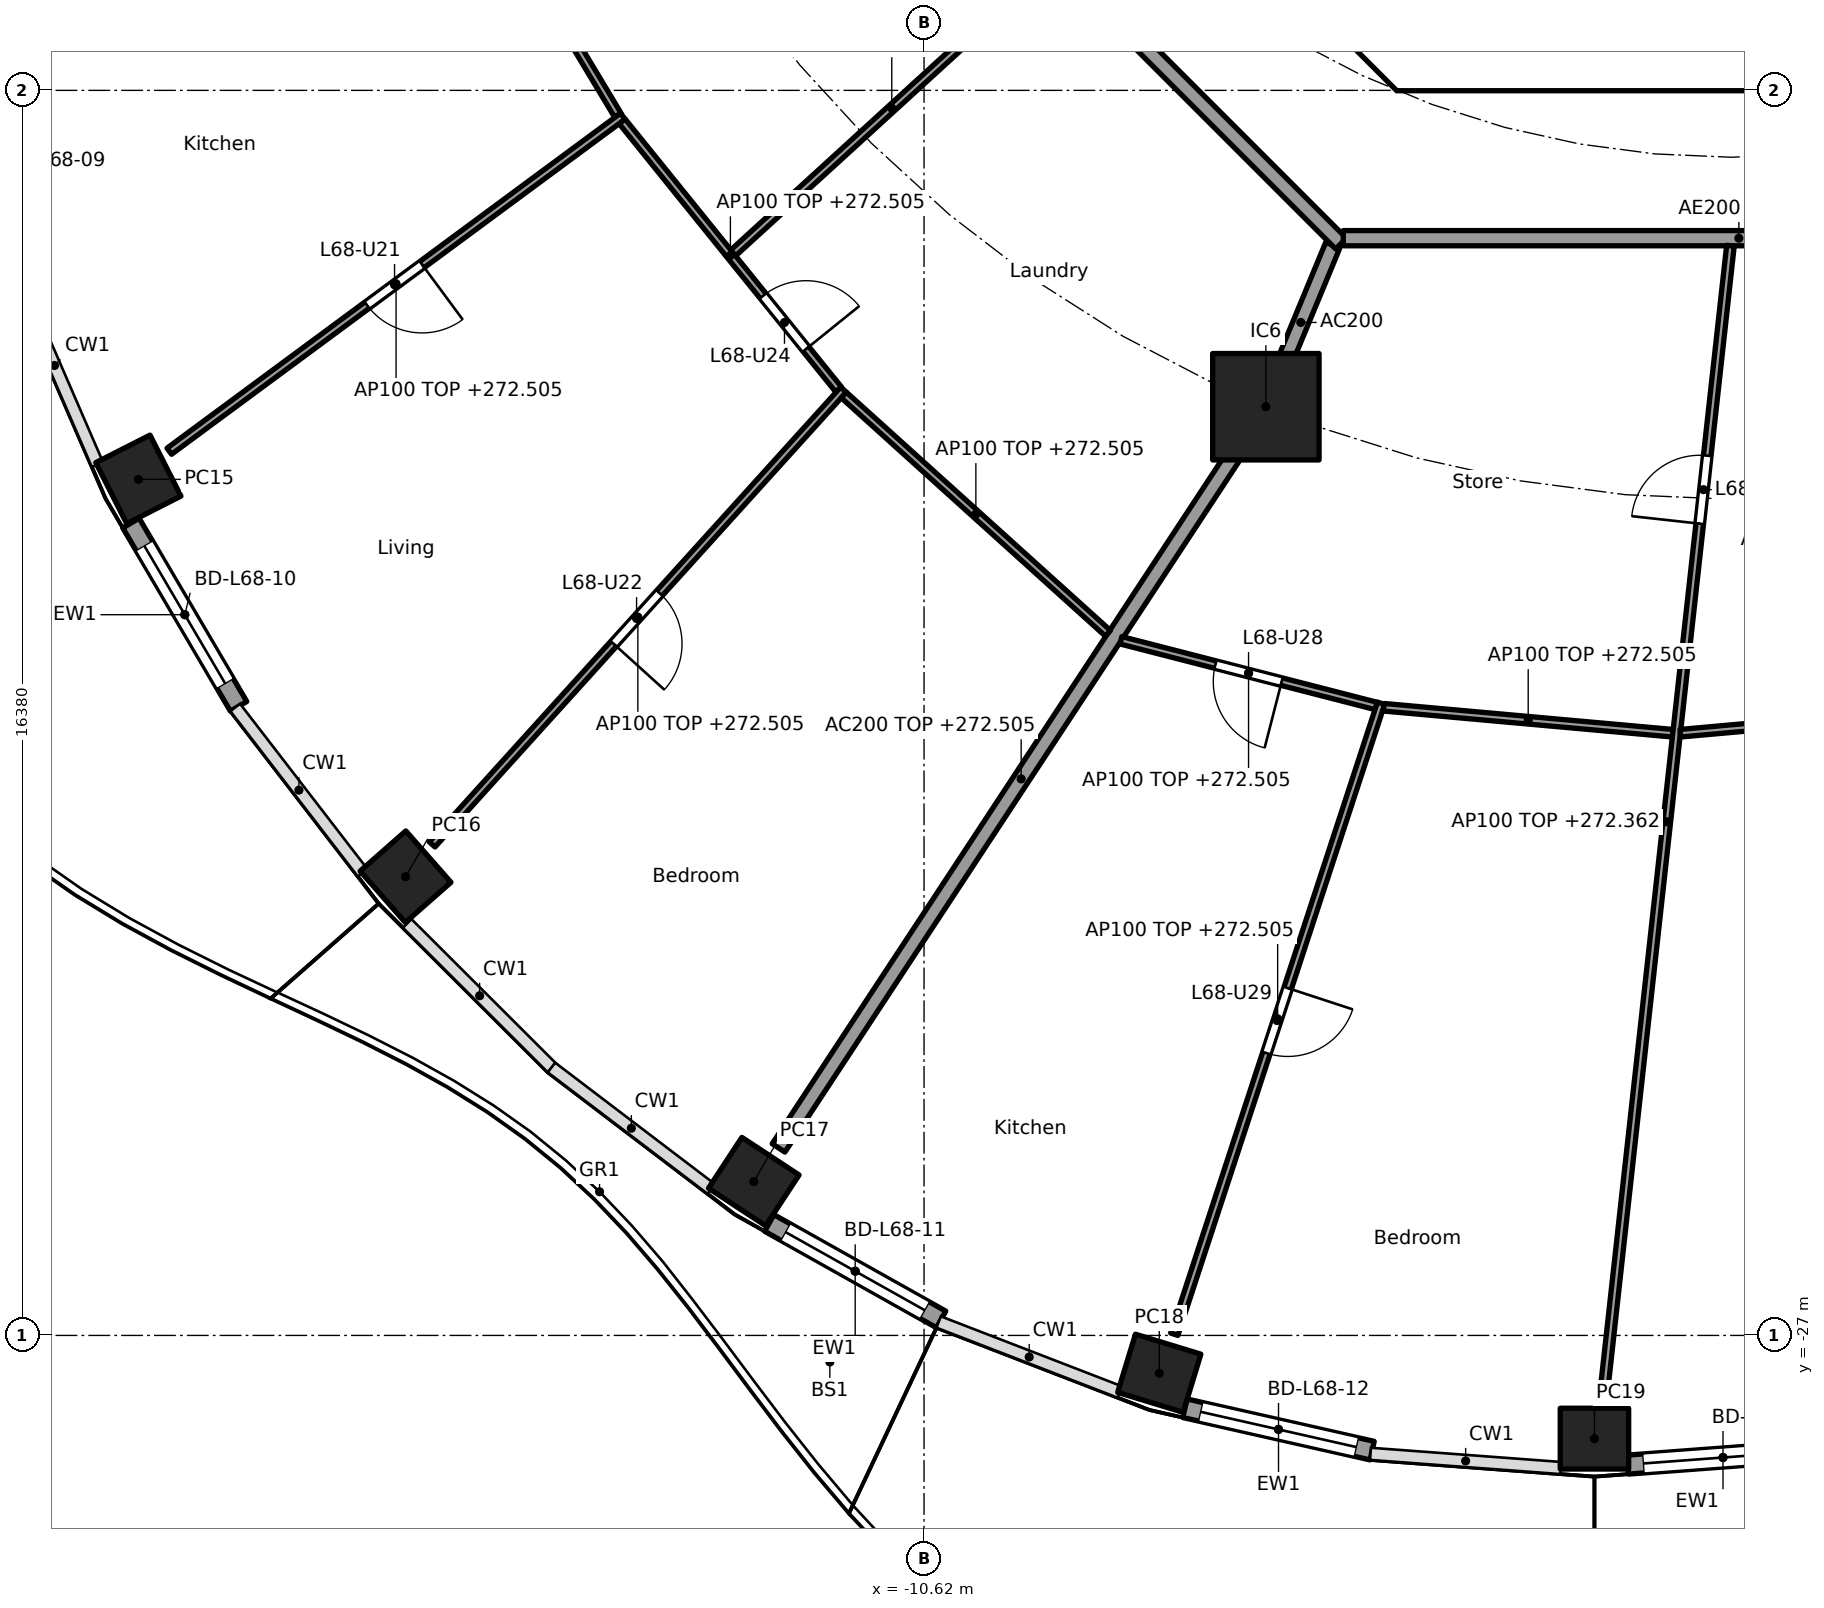
"""IFC4 building model, lengths in metres.
Left out: names, types, materials, properties, quantities, classifications, styles, units other than length and angle.
Written with IfcOpenShell. Run it as: python <this file> out.ifc"""

import sys

from ifc_helpers import new_model, si_unit, direction, frame, frame_2d, origin, origin_2d, place, context, subcontext, project, spatial, polyline, rectangle, hollow_rectangle, outline, extrude, element, fill, save


model = new_model("IFC4")
c1 = context("Model", 3, precision=1e-05, world=origin(), true_north=direction((0.0, 1.0)))
c2 = subcontext(c1, "Body", "Model", "MODEL_VIEW")
j1 = project(units=[si_unit("LENGTHUNIT", "METRE"), si_unit("PLANEANGLEUNIT", "RADIAN")], contexts=[c1])
p1 = place(None, origin())
s1 = spatial("IfcSite", under=j1, at=p1, CompositionType="ELEMENT")
p2 = place(p1, origin())
s2 = spatial("IfcBuilding", under=s1, at=p2, CompositionType="ELEMENT")
p3 = place(p2, frame((0.0, 0.0, 269.6)))
s3 = spatial("IfcBuildingStorey", under=s2, at=p3, CompositionType="ELEMENT", Elevation=269.6)
for number, where, z_axis, x_axis in (
    (1, (-20.957, -15.738, 0.0), (0.0, 0.0, 1.0), (0.452, -0.892, 0.0)),
    (2, (-17.441, -20.965, 0.0), (0.0, 0.0, 1.0), (0.66, -0.751, 0.0)),
    (3, (-12.86, -24.976, 0.0), (0.0, 0.0, 1.0), (0.836, -0.549, 0.0)),
    (4, (-7.525, -27.498, 0.0), (0.0, 0.0, 1.0), (0.957, -0.292, 0.0)),
    (5, (-1.8, -28.358, 0.0), (0.0, 0.0, 1.0), (1.0, 0.0, 0.0)),
):
    element("IfcColumn", number, at=place(p3, frame(where, z_axis=z_axis, x_axis=x_axis)), inside=s3, PredefinedType="COLUMN", context=c2, shape_type="SweptSolid", body=[
        extrude(hollow_rectangle(XDim=0.9, YDim=0.8, WallThickness=0.028, at=origin_2d()), origin(), (0.0, 0.0, 1.0), 3.7),
    ])
p4 = place(p3, frame((-6.123, -14.782, 0.0), z_axis=(0.0, 0.0, 1.0), x_axis=(1.0, 0.0, 0.0)))
e6 = element("IfcColumn", 6, at=p4, inside=s3, PredefinedType="COLUMN", context=c2, shape_type="SweptSolid", body=[
    extrude(rectangle(XDim=1.4, YDim=1.4, at=origin_2d()), origin(), (0.0, 0.0, 1.0), 3.7),
])
p5 = place(p3, frame((-19.638, -18.724, 0.0), z_axis=(0.0, 0.0, 1.0), x_axis=(-0.506371364425, 0.862315511452, 0.0)))
e7 = element("IfcWall", 7, at=p5, inside=s3, PredefinedType="SOLIDWALL", context=c2, shape_type="SweptSolid", body=[
    extrude(rectangle(XDim=2.796, YDim=0.25, at=frame_2d((1.398, 0.0))), origin(), (0.0, 0.0, 1.0), 3.44),
])
p6 = place(p5, frame((0.348, 0.0, 0.0)))
e8 = element("IfcOpeningElement", 8, at=p6, cuts=e7, PredefinedType="OPENING", context=c2, shape_type="SweptSolid", body=[
    extrude(rectangle(XDim=2.1, YDim=2.4, at=frame_2d((1.05, 1.2))), frame((0.0, 0.135, 0.0), z_axis=(0.0, -1.0, 0.0), x_axis=(1.0, 0.0, 0.0)), (0.0, 0.0, 1.0), 0.27),
])
p7 = place(p3, frame((-10.395, -26.789, 0.0), z_axis=(0.0, 0.0, 1.0), x_axis=(-0.872115604046, 0.489299880625, 0.0)))
e9 = element("IfcWall", 9, at=p7, inside=s3, PredefinedType="SOLIDWALL", context=c2, shape_type="SweptSolid", body=[
    extrude(rectangle(XDim=2.593, YDim=0.25, at=frame_2d((1.296, 0.0))), origin(), (0.0, 0.0, 1.0), 3.44),
])
p8 = place(p7, frame((0.247, 0.0, 0.0)))
e10 = element("IfcOpeningElement", 10, at=p8, cuts=e9, PredefinedType="OPENING", context=c2, shape_type="SweptSolid", body=[
    extrude(rectangle(XDim=2.1, YDim=2.4, at=frame_2d((1.05, 1.2))), frame((0.0, 0.135, 0.0), z_axis=(0.0, -1.0, 0.0), x_axis=(1.0, 0.0, 0.0)), (0.0, 0.0, 1.0), 0.27),
])
p9 = place(p3, frame((-4.725, -28.516, 0.0), z_axis=(0.0, 0.0, 1.0), x_axis=(-0.975319584032, 0.220797891756, 0.0)))
e11 = element("IfcWall", 11, at=p9, inside=s3, PredefinedType="SOLIDWALL", context=c2, shape_type="SweptSolid", body=[
    extrude(rectangle(XDim=2.525, YDim=0.25, at=frame_2d((1.263, 0.0))), origin(), (0.0, 0.0, 1.0), 3.44),
])
p10 = place(p9, frame((0.213, 0.0, 0.0)))
e12 = element("IfcOpeningElement", 12, at=p10, cuts=e11, PredefinedType="OPENING", context=c2, shape_type="SweptSolid", body=[
    extrude(rectangle(XDim=2.1, YDim=2.4, at=frame_2d((1.05, 1.2))), frame((0.0, 0.135, 0.0), z_axis=(0.0, -1.0, 0.0), x_axis=(1.0, 0.0, 0.0)), (0.0, 0.0, 1.0), 0.27),
])
p11 = place(p3, frame((1.143, -28.513, 0.0), z_axis=(0.0, 0.0, 1.0), x_axis=(-0.997236892469, -0.074287147606, 0.0)))
e13 = element("IfcWall", 13, at=p11, inside=s3, PredefinedType="SOLIDWALL", context=c2, shape_type="SweptSolid", body=[
    extrude(rectangle(XDim=2.511, YDim=0.25, at=frame_2d((1.255, 0.0))), origin(), (0.0, 0.0, 1.0), 3.44),
])
p12 = place(p11, frame((0.205, 0.0, 0.0)))
e14 = element("IfcOpeningElement", 14, at=p12, cuts=e13, PredefinedType="OPENING", context=c2, shape_type="SweptSolid", body=[
    extrude(rectangle(XDim=2.1, YDim=2.4, at=frame_2d((1.05, 1.2))), frame((0.0, 0.135, 0.0), z_axis=(0.0, -1.0, 0.0), x_axis=(1.0, 0.0, 0.0)), (0.0, 0.0, 1.0), 0.27),
])
p13 = place(p3, frame((-9.988, -4.613, 0.0), z_axis=(0.0, 0.0, 1.0), x_axis=(0.707106781187, -0.707106781187, 0.0)))
e15 = element("IfcWall", 15, at=p13, inside=s3, PredefinedType="SHEAR", context=c2, shape_type="SweptSolid", body=[
    extrude(rectangle(XDim=7.602, YDim=0.6, at=frame_2d((3.801, 0.0))), origin(), (0.0, 0.0, 1.0), 3.44),
])
p14 = place(p13, frame((6.151, 0.0, 0.0)))
e16 = element("IfcOpeningElement", 16, at=p14, cuts=e15, PredefinedType="OPENING", context=c2, shape_type="SweptSolid", body=[
    extrude(rectangle(XDim=1.1, YDim=2.1, at=frame_2d((0.55, 1.05))), frame((0.0, 0.31, 0.0), z_axis=(0.0, -1.0, 0.0), x_axis=(1.0, 0.0, 0.0)), (0.0, 0.0, 1.0), 0.62),
])
p15 = place(p3, origin())
e17 = element("IfcWall", 17, at=p15, inside=s3, PredefinedType="SHEAR", context=c2, shape_type="SweptSolid", body=[
    extrude(outline(polyline([(-4.152, -10.025), (4.152, -10.025), (4.401, -9.776), (4.825, -10.2), (4.401, -10.625), (-4.401, -10.625), (-4.825, -10.2), (-4.401, -9.776), (-4.152, -10.025)])), origin(), (0.0, 0.0, 1.0), 3.44),
])
p16 = place(p3, frame((-5.243, -12.657, 0.0), z_axis=(0.0, 0.0, 1.0), x_axis=(-0.382770106157, -0.923843626288, 0.0)))
e18 = element("IfcWall", 18, at=p16, inside=s3, PredefinedType="PARTITIONING", context=c2, shape_type="SweptSolid", body=[
    extrude(rectangle(XDim=2.199, YDim=0.2, at=frame_2d((1.1, 0.0))), origin(), (0.0, 0.0, 1.0), 3.44),
])
p17 = place(p3, frame((-6.151, -14.824, 0.0), z_axis=(0.0, 0.0, 1.0), x_axis=(-0.549345577828, -0.835595258556, 0.0)))
e19 = element("IfcWall", 19, at=p17, inside=s3, PredefinedType="PARTITIONING", context=c2, shape_type="SweptSolid", body=[
    extrude(rectangle(XDim=11.62, YDim=0.2, at=frame_2d((5.81, 0.0))), origin(), (0.0, 0.0, 1.0), 2.905),
])
p18 = place(p3, frame((-12.635, -5.134, 0.0), z_axis=(0.0, 0.0, 1.0), x_axis=(0.707106781187, -0.707106781187, 0.0)))
e20 = element("IfcWall", 20, at=p18, inside=s3, PredefinedType="PARTITIONING", context=c2, shape_type="SweptSolid", body=[
    extrude(rectangle(XDim=10.609, YDim=0.2, at=frame_2d((5.305, 0.0))), origin(), (0.0, 0.0, 1.0), 3.44),
])
p19 = place(p3, frame((-5.104, -12.565, 0.0), z_axis=(0.0, 0.0, 1.0), x_axis=(1.0, 0.0, 0.0)))
e21 = element("IfcWall", 21, at=p19, inside=s3, PredefinedType="PARTITIONING", context=c2, shape_type="SweptSolid", body=[
    extrude(rectangle(XDim=10.409, YDim=0.2, at=frame_2d((5.205, 0.0))), origin(), (0.0, 0.0, 1.0), 3.44),
])
p20 = place(p19, frame((5.906, 0.0, 0.0)))
e22 = element("IfcOpeningElement", 22, at=p20, cuts=e21, PredefinedType="OPENING", context=c2, shape_type="SweptSolid", body=[
    extrude(rectangle(XDim=1.0, YDim=2.1, at=frame_2d((0.5, 1.05))), frame((0.0, 0.11, 0.0), z_axis=(0.0, -1.0, 0.0), x_axis=(1.0, 0.0, 0.0)), (0.0, 0.0, 1.0), 0.22),
])
p21 = place(p3, frame((-16.972, -7.08, 0.0), z_axis=(0.0, 0.0, 1.0), x_axis=(0.514989049311, -0.857196756346, 0.0)))
e23 = element("IfcWall", 23, at=p21, inside=s3, PredefinedType="PARTITIONING", context=c2, shape_type="SweptSolid", body=[
    extrude(rectangle(XDim=4.512, YDim=0.1, at=frame_2d((2.256, 0.0))), origin(), (0.0, 0.0, 1.0), 2.905),
])
p22 = place(p21, frame((1.806, 0.0, 0.0)))
e24 = element("IfcOpeningElement", 24, at=p22, cuts=e23, PredefinedType="OPENING", context=c2, shape_type="SweptSolid", body=[
    extrude(rectangle(XDim=0.9, YDim=2.1, at=frame_2d((0.45, 1.05))), frame((0.0, 0.06, 0.0), z_axis=(0.0, -1.0, 0.0), x_axis=(1.0, 0.0, 0.0)), (0.0, 0.0, 1.0), 0.12),
])
p23 = place(p3, frame((-14.582, -10.96, 0.0), z_axis=(0.0, 0.0, 1.0), x_axis=(-0.804405200554, -0.594081032623, 0.0)))
e25 = element("IfcWall", 25, at=p23, inside=s3, PredefinedType="PARTITIONING", context=c2, shape_type="SweptSolid", body=[
    extrude(rectangle(XDim=7.418, YDim=0.1, at=frame_2d((3.709, 0.0))), origin(), (0.0, 0.0, 1.0), 2.905),
])
p24 = place(p23, frame((3.284, 0.0, 0.0)))
e26 = element("IfcOpeningElement", 26, at=p24, cuts=e25, PredefinedType="OPENING", context=c2, shape_type="SweptSolid", body=[
    extrude(rectangle(XDim=0.9, YDim=2.1, at=frame_2d((0.45, 1.05))), frame((0.0, 0.06, 0.0), z_axis=(0.0, -1.0, 0.0), x_axis=(1.0, 0.0, 0.0)), (0.0, 0.0, 1.0), 0.12),
])
p25 = place(p3, frame((-14.591, -11.029, 0.0), z_axis=(0.0, 0.0, 1.0), x_axis=(0.628170338674, -0.778075848237, 0.0)))
e27 = element("IfcWall", 27, at=p25, inside=s3, PredefinedType="PARTITIONING", context=c2, shape_type="SweptSolid", body=[
    extrude(rectangle(XDim=4.532, YDim=0.1, at=frame_2d((2.266, 0.0))), origin(), (0.0, 0.0, 1.0), 2.905),
])
p26 = place(p25, frame((2.949, 0.0, 0.0)))
e28 = element("IfcOpeningElement", 28, at=p26, cuts=e27, PredefinedType="OPENING", context=c2, shape_type="SweptSolid", body=[
    extrude(rectangle(XDim=0.9, YDim=2.1, at=frame_2d((0.45, 1.05))), frame((0.0, 0.06, 0.0), z_axis=(0.0, -1.0, 0.0), x_axis=(1.0, 0.0, 0.0)), (0.0, 0.0, 1.0), 0.12),
])
p27 = place(p3, frame((-8.958, -8.952, 0.0), z_axis=(0.0, 0.0, 1.0), x_axis=(-0.73876526954, -0.673962815385, 0.0)))
e29 = element("IfcWall", 29, at=p27, inside=s3, PredefinedType="PARTITIONING", context=c2, shape_type="SweptSolid", body=[
    extrude(rectangle(XDim=5.647, YDim=0.1, at=frame_2d((2.824, 0.0))), origin(), (0.0, 0.0, 1.0), 2.762),
])
p28 = place(p3, frame((-11.679, -14.557, 0.0), z_axis=(0.0, 0.0, 1.0), x_axis=(-0.670800011545, -0.741638284146, 0.0)))
e30 = element("IfcWall", 30, at=p28, inside=s3, PredefinedType="PARTITIONING", context=c2, shape_type="SweptSolid", body=[
    extrude(rectangle(XDim=8.068, YDim=0.1, at=frame_2d((4.034, 0.0))), origin(), (0.0, 0.0, 1.0), 2.905),
])
p29 = place(p28, frame((3.609, 0.0, 0.0)))
e31 = element("IfcOpeningElement", 31, at=p29, cuts=e30, PredefinedType="OPENING", context=c2, shape_type="SweptSolid", body=[
    extrude(rectangle(XDim=0.9, YDim=2.1, at=frame_2d((0.45, 1.05))), frame((0.0, 0.06, 0.0), z_axis=(0.0, -1.0, 0.0), x_axis=(1.0, 0.0, 0.0)), (0.0, 0.0, 1.0), 0.12),
])
p30 = place(p3, frame((-11.676, -14.628, 0.0), z_axis=(0.0, 0.0, 1.0), x_axis=(0.74245829867, -0.669892285921, 0.0)))
e32 = element("IfcWall", 32, at=p30, inside=s3, PredefinedType="PARTITIONING", context=c2, shape_type="SweptSolid", body=[
    extrude(rectangle(XDim=4.68, YDim=0.1, at=frame_2d((2.34, 0.0))), origin(), (0.0, 0.0, 1.0), 2.905),
])
p31 = place(p3, frame((-8.03, -17.854, 0.0), z_axis=(0.0, 0.0, 1.0), x_axis=(0.968441967324, -0.249239154077, 0.0)))
e33 = element("IfcWall", 33, at=p31, inside=s3, PredefinedType="PARTITIONING", context=c2, shape_type="SweptSolid", body=[
    extrude(rectangle(XDim=3.468, YDim=0.1, at=frame_2d((1.734, 0.0))), origin(), (0.0, 0.0, 1.0), 2.905),
])
p32 = place(p31, frame((1.284, 0.0, 0.0)))
e34 = element("IfcOpeningElement", 34, at=p32, cuts=e33, PredefinedType="OPENING", context=c2, shape_type="SweptSolid", body=[
    extrude(rectangle(XDim=0.9, YDim=2.1, at=frame_2d((0.45, 1.05))), frame((0.0, 0.06, 0.0), z_axis=(0.0, -1.0, 0.0), x_axis=(1.0, 0.0, 0.0)), (0.0, 0.0, 1.0), 0.12),
])
p33 = place(p3, frame((-4.608, -18.684, 0.0), z_axis=(0.0, 0.0, 1.0), x_axis=(-0.311419102378, -0.95027266754, 0.0)))
e35 = element("IfcWall", 35, at=p33, inside=s3, PredefinedType="PARTITIONING", context=c2, shape_type="SweptSolid", body=[
    extrude(rectangle(XDim=8.735, YDim=0.1, at=frame_2d((4.367, 0.0))), origin(), (0.0, 0.0, 1.0), 2.905),
])
p34 = place(p33, frame((3.942, 0.0, 0.0)))
e36 = element("IfcOpeningElement", 36, at=p34, cuts=e35, PredefinedType="OPENING", context=c2, shape_type="SweptSolid", body=[
    extrude(rectangle(XDim=0.9, YDim=2.1, at=frame_2d((0.45, 1.05))), frame((0.0, 0.06, 0.0), z_axis=(0.0, -1.0, 0.0), x_axis=(1.0, 0.0, 0.0)), (0.0, 0.0, 1.0), 0.12),
])
p35 = place(p3, frame((-4.573, -18.736, 0.0), z_axis=(0.0, 0.0, 1.0), x_axis=(0.995986472869, -0.089503887414, 0.0)))
e37 = element("IfcWall", 37, at=p35, inside=s3, PredefinedType="PARTITIONING", context=c2, shape_type="SweptSolid", body=[
    extrude(rectangle(XDim=3.819, YDim=0.1, at=frame_2d((1.909, 0.0))), origin(), (0.0, 0.0, 1.0), 2.905),
])
p36 = place(p3, frame((-0.011, -12.664, 0.0), z_axis=(0.0, 0.0, 1.0), x_axis=(-0.109805889692, -0.993953050495, 0.0)))
e38 = element("IfcWall", 38, at=p36, inside=s3, PredefinedType="PARTITIONING", context=c2, shape_type="SweptSolid", body=[
    extrude(rectangle(XDim=15.248, YDim=0.1, at=frame_2d((7.624, 0.0))), origin(), (0.0, 0.0, 1.0), 2.762),
])
p37 = place(p36, frame((2.778, 0.0, 0.0)))
e39 = element("IfcOpeningElement", 39, at=p37, cuts=e38, PredefinedType="OPENING", context=c2, shape_type="SweptSolid", body=[
    extrude(rectangle(XDim=0.9, YDim=2.1, at=frame_2d((0.45, 1.05))), frame((0.0, 0.06, 0.0), z_axis=(0.0, -1.0, 0.0), x_axis=(1.0, 0.0, 0.0)), (0.0, 0.0, 1.0), 0.12),
])
p38 = place(p3, frame((-0.67, -19.077, 0.0), z_axis=(0.0, 0.0, 1.0), x_axis=(0.995986472869, 0.089503887414, 0.0)))
e40 = element("IfcWall", 40, at=p38, inside=s3, PredefinedType="PARTITIONING", context=c2, shape_type="SweptSolid", body=[
    extrude(rectangle(XDim=3.819, YDim=0.1, at=frame_2d((1.909, 0.0))), origin(), (0.0, 0.0, 1.0), 2.905),
])
p39 = place(p38, frame((1.459, 0.0, 0.0)))
e41 = element("IfcOpeningElement", 41, at=p39, cuts=e40, PredefinedType="OPENING", context=c2, shape_type="SweptSolid", body=[
    extrude(rectangle(XDim=0.9, YDim=2.1, at=frame_2d((0.45, 1.05))), frame((0.0, 0.06, 0.0), z_axis=(0.0, -1.0, 0.0), x_axis=(1.0, 0.0, 0.0)), (0.0, 0.0, 1.0), 0.12),
])
p40 = place(p6, origin())
e42 = element("IfcDoor", 42, at=p40, inside=s3, OperationType="SLIDING_TO_LEFT", PredefinedType="DOOR", context=c2, shape_type="SweptSolid", body=[
    extrude(rectangle(XDim=2.1, YDim=2.4, at=frame_2d((1.05, 1.2))), frame((0.0, 0.025, 0.0), z_axis=(0.0, -1.0, 0.0), x_axis=(1.0, 0.0, 0.0)), (0.0, 0.0, 1.0), 0.05),
])
fill(e8, e42)
p41 = place(p8, origin())
e43 = element("IfcDoor", 43, at=p41, inside=s3, OperationType="SLIDING_TO_LEFT", PredefinedType="DOOR", context=c2, shape_type="SweptSolid", body=[
    extrude(rectangle(XDim=2.1, YDim=2.4, at=frame_2d((1.05, 1.2))), frame((0.0, 0.025, 0.0), z_axis=(0.0, -1.0, 0.0), x_axis=(1.0, 0.0, 0.0)), (0.0, 0.0, 1.0), 0.05),
])
fill(e10, e43)
p42 = place(p10, origin())
e44 = element("IfcDoor", 44, at=p42, inside=s3, OperationType="SLIDING_TO_LEFT", PredefinedType="DOOR", context=c2, shape_type="SweptSolid", body=[
    extrude(rectangle(XDim=2.1, YDim=2.4, at=frame_2d((1.05, 1.2))), frame((0.0, 0.025, 0.0), z_axis=(0.0, -1.0, 0.0), x_axis=(1.0, 0.0, 0.0)), (0.0, 0.0, 1.0), 0.05),
])
fill(e12, e44)
p43 = place(p12, origin())
e45 = element("IfcDoor", 45, at=p43, inside=s3, OperationType="SLIDING_TO_LEFT", PredefinedType="DOOR", context=c2, shape_type="SweptSolid", body=[
    extrude(rectangle(XDim=2.1, YDim=2.4, at=frame_2d((1.05, 1.2))), frame((0.0, 0.025, 0.0), z_axis=(0.0, -1.0, 0.0), x_axis=(1.0, 0.0, 0.0)), (0.0, 0.0, 1.0), 0.05),
])
fill(e14, e45)
p44 = place(p24, origin())
e46 = element("IfcDoor", 46, at=p44, inside=s3, OperationType="SINGLE_SWING_LEFT", PredefinedType="DOOR", context=c2, shape_type="SweptSolid", body=[
    extrude(rectangle(XDim=0.9, YDim=2.1, at=frame_2d((0.45, 1.05))), frame((0.0, 0.025, 0.0), z_axis=(0.0, -1.0, 0.0), x_axis=(1.0, 0.0, 0.0)), (0.0, 0.0, 1.0), 0.05),
])
fill(e26, e46)
p45 = place(p29, origin())
e47 = element("IfcDoor", 47, at=p45, inside=s3, OperationType="SINGLE_SWING_RIGHT", PredefinedType="DOOR", context=c2, shape_type="SweptSolid", body=[
    extrude(rectangle(XDim=0.9, YDim=2.1, at=frame_2d((0.45, 1.05))), frame((0.0, 0.025, 0.0), z_axis=(0.0, -1.0, 0.0), x_axis=(1.0, 0.0, 0.0)), (0.0, 0.0, 1.0), 0.05),
])
fill(e31, e47)
p46 = place(p26, origin())
e48 = element("IfcDoor", 48, at=p46, inside=s3, OperationType="SINGLE_SWING_RIGHT", PredefinedType="DOOR", context=c2, shape_type="SweptSolid", body=[
    extrude(rectangle(XDim=0.9, YDim=2.1, at=frame_2d((0.45, 1.05))), frame((0.0, 0.025, 0.0), z_axis=(0.0, -1.0, 0.0), x_axis=(1.0, 0.0, 0.0)), (0.0, 0.0, 1.0), 0.05),
])
fill(e28, e48)
p47 = place(p37, frame((0.9, 0.0, 0.0), x_axis=(-1.0, 0.0, 0.0)))
e49 = element("IfcDoor", 49, at=p47, inside=s3, OperationType="SINGLE_SWING_LEFT", PredefinedType="DOOR", context=c2, shape_type="SweptSolid", body=[
    extrude(rectangle(XDim=0.9, YDim=2.1, at=frame_2d((0.45, 1.05))), frame((0.0, 0.025, 0.0), z_axis=(0.0, -1.0, 0.0), x_axis=(1.0, 0.0, 0.0)), (0.0, 0.0, 1.0), 0.05),
])
fill(e39, e49)
p48 = place(p32, frame((0.9, 0.0, 0.0), x_axis=(-1.0, 0.0, 0.0)))
e50 = element("IfcDoor", 50, at=p48, inside=s3, OperationType="SINGLE_SWING_LEFT", PredefinedType="DOOR", context=c2, shape_type="SweptSolid", body=[
    extrude(rectangle(XDim=0.9, YDim=2.1, at=frame_2d((0.45, 1.05))), frame((0.0, 0.025, 0.0), z_axis=(0.0, -1.0, 0.0), x_axis=(1.0, 0.0, 0.0)), (0.0, 0.0, 1.0), 0.05),
])
fill(e34, e50)
p49 = place(p34, origin())
e51 = element("IfcDoor", 51, at=p49, inside=s3, OperationType="SINGLE_SWING_LEFT", PredefinedType="DOOR", context=c2, shape_type="SweptSolid", body=[
    extrude(rectangle(XDim=0.9, YDim=2.1, at=frame_2d((0.45, 1.05))), frame((0.0, 0.025, 0.0), z_axis=(0.0, -1.0, 0.0), x_axis=(1.0, 0.0, 0.0)), (0.0, 0.0, 1.0), 0.05),
])
fill(e36, e51)
save(model, sys.argv[1])
